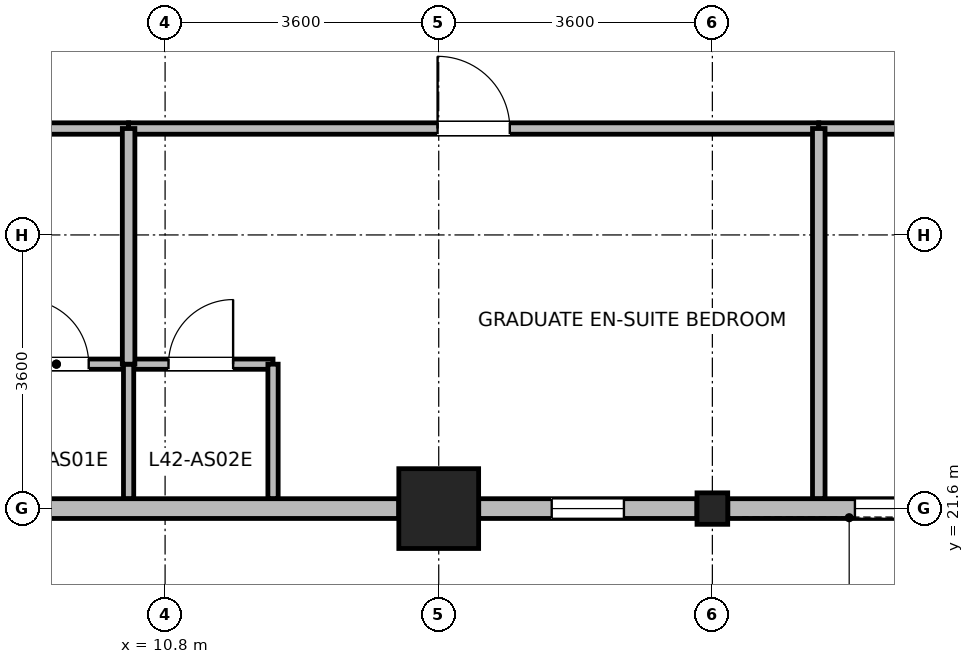
"""IFC4 building model, lengths in metres.
Left out: names, types, materials, properties, quantities, classifications, styles, units other than length and angle.
Written with IfcOpenShell. Run it as: python <this file> out.ifc"""

import sys

from ifc_helpers import new_model, si_unit, direction, frame, frame_2d, origin, origin_2d, place, context, subcontext, project, spatial, rectangle, i_section, extrude, source, transform, mapped, element, fill, save


model = new_model("IFC4")
c1 = context("Model", 3, precision=1e-05, world=origin(), true_north=direction((0.0, 1.0)))
c2 = subcontext(c1, "Body", "Model", "MODEL_VIEW")
j1 = project(units=[si_unit("LENGTHUNIT", "METRE"), si_unit("PLANEANGLEUNIT", "RADIAN")], contexts=[c1])
p1 = place(None, origin())
s1 = spatial("IfcSite", under=j1, at=p1, CompositionType="ELEMENT")
p2 = place(p1, origin())
s2 = spatial("IfcBuilding", under=s1, at=p2, CompositionType="ELEMENT")
p3 = place(p2, frame((0.0, 0.0, 166.1)))
s3 = spatial("IfcBuildingStorey", under=s2, at=p3, CompositionType="ELEMENT", Elevation=166.1)
m1 = source(origin(), c2, "Body", "SweptSolid", [
    extrude(rectangle(XDim=1.05, YDim=1.05, at=origin_2d()), origin(), (0.0, 0.0, 1.0), 3.7),
])
p4 = place(p3, frame((14.4, 21.6, 0.0), z_axis=(0.0, 0.0, 1.0), x_axis=(1.0, 0.0, 0.0)))
e1 = element("IfcColumn", 1, at=p4, inside=s3, PredefinedType="COLUMN", context=c2, shape_type="MappedRepresentation", body=[
    mapped(m1, transform((0.0, 0.0, 0.0), x_axis=(1.0, 0.0, 0.0), y_axis=(0.0, 1.0, 0.0), z_axis=(0.0, 0.0, 1.0), scale=1.0)),
])
m2 = source(origin(), c2, "Body", "SweptSolid", [
    extrude(i_section(OverallWidth=0.404, OverallDepth=0.414, WebThickness=0.021, FlangeThickness=0.028, FilletRadius=0.015, at=origin_2d()), origin(), (0.0, 0.0, 1.0), 3.7),
])
p5 = place(p3, frame((18.0, 21.6, 0.0), z_axis=(0.0, 0.0, 1.0), x_axis=(1.0, 0.0, 0.0)))
e2 = element("IfcColumn", 2, at=p5, inside=s3, PredefinedType="COLUMN", context=c2, shape_type="MappedRepresentation", body=[
    mapped(m2, transform((0.0, 0.0, 0.0), x_axis=(1.0, 0.0, 0.0), y_axis=(0.0, 1.0, 0.0), z_axis=(0.0, 0.0, 1.0), scale=1.0)),
])
p6 = place(p3, frame((13.874, 21.6, 0.0), z_axis=(0.0, 0.0, 1.0), x_axis=(-1.0, 0.0, 0.0)))
e3 = element("IfcWall", 3, at=p6, inside=s3, PredefinedType="STANDARD", context=c2, shape_type="SweptSolid", body=[
    extrude(rectangle(XDim=13.239, YDim=0.26, at=frame_2d((6.62, 0.0))), origin(), (0.0, 0.0, 1.0), 3.44),
])
p7 = place(p6, frame((7.524, 0.0, 0.85)))
e4 = element("IfcOpeningElement", 4, at=p7, cuts=e3, PredefinedType="OPENING", context=c2, shape_type="SweptSolid", body=[
    extrude(rectangle(XDim=1.5, YDim=1.85, at=frame_2d((0.75, 0.925))), frame((0.0, 0.14, 0.0), z_axis=(0.0, -1.0, 0.0), x_axis=(1.0, 0.0, 0.0)), (0.0, 0.0, 1.0), 0.28),
])
p8 = place(p6, frame((10.834, 0.0, 0.85)))
e5 = element("IfcOpeningElement", 5, at=p8, cuts=e3, PredefinedType="OPENING", context=c2, shape_type="SweptSolid", body=[
    extrude(rectangle(XDim=1.5, YDim=1.85, at=frame_2d((0.75, 0.925))), frame((0.0, 0.14, 0.0), z_axis=(0.0, -1.0, 0.0), x_axis=(1.0, 0.0, 0.0)), (0.0, 0.0, 1.0), 0.28),
])
p9 = place(p3, frame((17.797, 21.6, 0.0), z_axis=(0.0, 0.0, 1.0), x_axis=(-1.0, 0.0, 0.0)))
e6 = element("IfcWall", 6, at=p9, inside=s3, PredefinedType="STANDARD", context=c2, shape_type="SweptSolid", body=[
    extrude(rectangle(XDim=2.871, YDim=0.26, at=frame_2d((1.436, 0.0))), origin(), (0.0, 0.0, 1.0), 2.99),
])
p10 = place(p9, frame((0.96, 0.0, 0.85)))
e7 = element("IfcOpeningElement", 7, at=p10, cuts=e6, PredefinedType="OPENING", context=c2, shape_type="SweptSolid", body=[
    extrude(rectangle(XDim=0.95, YDim=1.75, at=frame_2d((0.475, 0.875))), frame((0.0, 0.14, 0.0), z_axis=(0.0, -1.0, 0.0), x_axis=(1.0, 0.0, 0.0)), (0.0, 0.0, 1.0), 0.28),
])
p11 = place(p3, frame((21.074, 21.6, 0.0), z_axis=(0.0, 0.0, 1.0), x_axis=(-1.0, 0.0, 0.0)))
e8 = element("IfcWall", 8, at=p11, inside=s3, PredefinedType="STANDARD", context=c2, shape_type="SweptSolid", body=[
    extrude(rectangle(XDim=2.871, YDim=0.26, at=frame_2d((1.436, 0.0))), origin(), (0.0, 0.0, 1.0), 2.99),
])
p12 = place(p11, frame((0.249, 0.0, 0.85)))
e9 = element("IfcOpeningElement", 9, at=p12, cuts=e8, PredefinedType="OPENING", context=c2, shape_type="SweptSolid", body=[
    extrude(rectangle(XDim=0.95, YDim=1.75, at=frame_2d((0.475, 0.875))), frame((0.0, 0.14, 0.0), z_axis=(0.0, -1.0, 0.0), x_axis=(1.0, 0.0, 0.0)), (0.0, 0.0, 1.0), 0.28),
])
p13 = place(p3, frame((8.42, 23.5, 0.0), z_axis=(0.0, 0.0, 1.0), x_axis=(1.0, 0.0, 0.0)))
e10 = element("IfcWall", 10, at=p13, inside=s3, PredefinedType="PARTITIONING", context=c2, shape_type="SweptSolid", body=[
    extrude(rectangle(XDim=1.9, YDim=0.135, at=frame_2d((0.95, 0.0))), origin(), (0.0, 0.0, 1.0), 3.44),
])
p14 = place(p13, frame((0.525, 0.0, 0.0)))
e11 = element("IfcOpeningElement", 11, at=p14, cuts=e10, PredefinedType="OPENING", context=c2, shape_type="SweptSolid", body=[
    extrude(rectangle(XDim=0.85, YDim=2.04, at=frame_2d((0.425, 1.02))), frame((0.0, 0.078, 0.0), z_axis=(0.0, -1.0, 0.0), x_axis=(1.0, 0.0, 0.0)), (0.0, 0.0, 1.0), 0.155),
])
p15 = place(p3, frame((10.32, 23.5, 0.0), z_axis=(0.0, 0.0, 1.0), x_axis=(1.0, 0.0, 0.0)))
e12 = element("IfcWall", 12, at=p15, inside=s3, PredefinedType="PARTITIONING", context=c2, shape_type="SweptSolid", body=[
    extrude(rectangle(XDim=1.9, YDim=0.135, at=frame_2d((0.95, 0.0))), origin(), (0.0, 0.0, 1.0), 3.44),
])
p16 = place(p15, frame((0.525, 0.0, 0.0)))
e13 = element("IfcOpeningElement", 13, at=p16, cuts=e12, PredefinedType="OPENING", context=c2, shape_type="SweptSolid", body=[
    extrude(rectangle(XDim=0.85, YDim=2.04, at=frame_2d((0.425, 1.02))), frame((0.0, 0.078, 0.0), z_axis=(0.0, -1.0, 0.0), x_axis=(1.0, 0.0, 0.0)), (0.0, 0.0, 1.0), 0.155),
])
for number, where, z_axis, x_axis in (
    (14, (10.32, 21.732, 0.0), (0.0, 0.0, 1.0), (0.0, 1.0, 0.0)),
    (15, (12.22, 21.732, 0.0), (0.0, 0.0, 1.0), (0.0, 1.0, 0.0)),
):
    element("IfcWall", number, at=place(p3, frame(where, z_axis=z_axis, x_axis=x_axis)), inside=s3, PredefinedType="PARTITIONING", context=c2, shape_type="SweptSolid", body=[
        extrude(rectangle(XDim=1.768, YDim=0.135, at=frame_2d((0.884, 0.0))), origin(), (0.0, 0.0, 1.0), 3.44),
    ])
p17 = place(p3, frame((0.632, 26.6, 0.0), z_axis=(0.0, 0.0, 1.0), x_axis=(1.0, 0.0, 0.0)))
e16 = element("IfcWall", 16, at=p17, inside=s3, PredefinedType="PARTITIONING", context=c2, shape_type="SweptSolid", body=[
    extrude(rectangle(XDim=9.688, YDim=0.15, at=frame_2d((4.844, 0.0))), origin(), (0.0, 0.0, 1.0), 3.44),
])
p18 = place(p17, frame((4.369, 0.0, 0.0)))
e17 = element("IfcOpeningElement", 17, at=p18, cuts=e16, PredefinedType="OPENING", context=c2, shape_type="SweptSolid", body=[
    extrude(rectangle(XDim=0.95, YDim=2.1, at=frame_2d((0.475, 1.05))), frame((0.0, 0.085, 0.0), z_axis=(0.0, -1.0, 0.0), x_axis=(1.0, 0.0, 0.0)), (0.0, 0.0, 1.0), 0.17),
])
p19 = place(p3, frame((10.32, 26.6, 0.0), z_axis=(0.0, 0.0, 1.0), x_axis=(1.0, 0.0, 0.0)))
e18 = element("IfcWall", 18, at=p19, inside=s3, PredefinedType="PARTITIONING", context=c2, shape_type="SweptSolid", body=[
    extrude(rectangle(XDim=9.08, YDim=0.15, at=frame_2d((4.54, 0.0))), origin(), (0.0, 0.0, 1.0), 3.44),
])
p20 = place(p19, frame((4.065, 0.0, 0.0)))
e19 = element("IfcOpeningElement", 19, at=p20, cuts=e18, PredefinedType="OPENING", context=c2, shape_type="SweptSolid", body=[
    extrude(rectangle(XDim=0.95, YDim=2.1, at=frame_2d((0.475, 1.05))), frame((0.0, 0.085, 0.0), z_axis=(0.0, -1.0, 0.0), x_axis=(1.0, 0.0, 0.0)), (0.0, 0.0, 1.0), 0.17),
])
p21 = place(p3, frame((19.4, 26.6, 0.0), z_axis=(0.0, 0.0, 1.0), x_axis=(1.0, 0.0, 0.0)))
e20 = element("IfcWall", 20, at=p21, inside=s3, PredefinedType="PARTITIONING", context=c2, shape_type="SweptSolid", body=[
    extrude(rectangle(XDim=8.24, YDim=0.15, at=frame_2d((4.12, 0.0))), origin(), (0.0, 0.0, 1.0), 3.44),
])
p22 = place(p21, frame((3.47, 0.0, 0.0)))
e21 = element("IfcOpeningElement", 21, at=p22, cuts=e20, PredefinedType="OPENING", context=c2, shape_type="SweptSolid", body=[
    extrude(rectangle(XDim=1.3, YDim=2.12, at=frame_2d((0.65, 1.06))), frame((0.0, 0.085, 0.0), z_axis=(0.0, -1.0, 0.0), x_axis=(1.0, 0.0, 0.0)), (0.0, 0.0, 1.0), 0.17),
])
p23 = place(p3, frame((19.4, 21.732, 0.0), z_axis=(0.0, 0.0, 1.0), x_axis=(0.0, 1.0, 0.0)))
e22 = element("IfcWall", 22, at=p23, inside=s3, PredefinedType="PARTITIONING", context=c2, shape_type="SweptSolid", body=[
    extrude(rectangle(XDim=4.868, YDim=0.165, at=frame_2d((2.434, 0.0))), origin(), (0.0, 0.0, 1.0), 3.44),
])
p24 = place(p3, frame((10.32, 23.5, 0.0), z_axis=(0.0, 0.0, 1.0), x_axis=(0.0, 1.0, 0.0)))
e23 = element("IfcWall", 23, at=p24, inside=s3, PredefinedType="PARTITIONING", context=c2, shape_type="SweptSolid", body=[
    extrude(rectangle(XDim=3.1, YDim=0.165, at=frame_2d((1.55, 0.0))), origin(), (0.0, 0.0, 1.0), 3.44),
])
p25 = place(p10, origin())
e24 = element("IfcWindow", 24, at=p25, inside=s3, PartitioningType="SINGLE_PANEL", PredefinedType="WINDOW", context=c2, shape_type="SweptSolid", body=[
    extrude(rectangle(XDim=0.95, YDim=1.75, at=frame_2d((0.475, 0.875))), frame((0.0, 0.03, 0.0), z_axis=(0.0, -1.0, 0.0), x_axis=(1.0, 0.0, 0.0)), (0.0, 0.0, 1.0), 0.06),
])
fill(e7, e24)
p26 = place(p12, origin())
e25 = element("IfcWindow", 25, at=p26, inside=s3, PartitioningType="SINGLE_PANEL", PredefinedType="WINDOW", context=c2, shape_type="SweptSolid", body=[
    extrude(rectangle(XDim=0.95, YDim=1.75, at=frame_2d((0.475, 0.875))), frame((0.0, 0.03, 0.0), z_axis=(0.0, -1.0, 0.0), x_axis=(1.0, 0.0, 0.0)), (0.0, 0.0, 1.0), 0.06),
])
fill(e9, e25)
p27 = place(p14, origin())
e26 = element("IfcDoor", 26, at=p27, inside=s3, OperationType="SINGLE_SWING_LEFT", PredefinedType="DOOR", context=c2, shape_type="SweptSolid", body=[
    extrude(rectangle(XDim=0.85, YDim=2.04, at=frame_2d((0.425, 1.02))), frame((0.0, 0.025, 0.0), z_axis=(0.0, -1.0, 0.0), x_axis=(1.0, 0.0, 0.0)), (0.0, 0.0, 1.0), 0.05),
])
fill(e11, e26)
p28 = place(p16, origin())
e27 = element("IfcDoor", 27, at=p28, inside=s3, OperationType="SINGLE_SWING_RIGHT", PredefinedType="DOOR", context=c2, shape_type="SweptSolid", body=[
    extrude(rectangle(XDim=0.85, YDim=2.04, at=frame_2d((0.425, 1.02))), frame((0.0, 0.025, 0.0), z_axis=(0.0, -1.0, 0.0), x_axis=(1.0, 0.0, 0.0)), (0.0, 0.0, 1.0), 0.05),
])
fill(e13, e27)
p29 = place(p20, origin())
e28 = element("IfcDoor", 28, at=p29, inside=s3, OperationType="SINGLE_SWING_LEFT", PredefinedType="DOOR", context=c2, shape_type="SweptSolid", body=[
    extrude(rectangle(XDim=0.95, YDim=2.1, at=frame_2d((0.475, 1.05))), frame((0.0, 0.025, 0.0), z_axis=(0.0, -1.0, 0.0), x_axis=(1.0, 0.0, 0.0)), (0.0, 0.0, 1.0), 0.05),
])
fill(e19, e28)
save(model, sys.argv[1])
